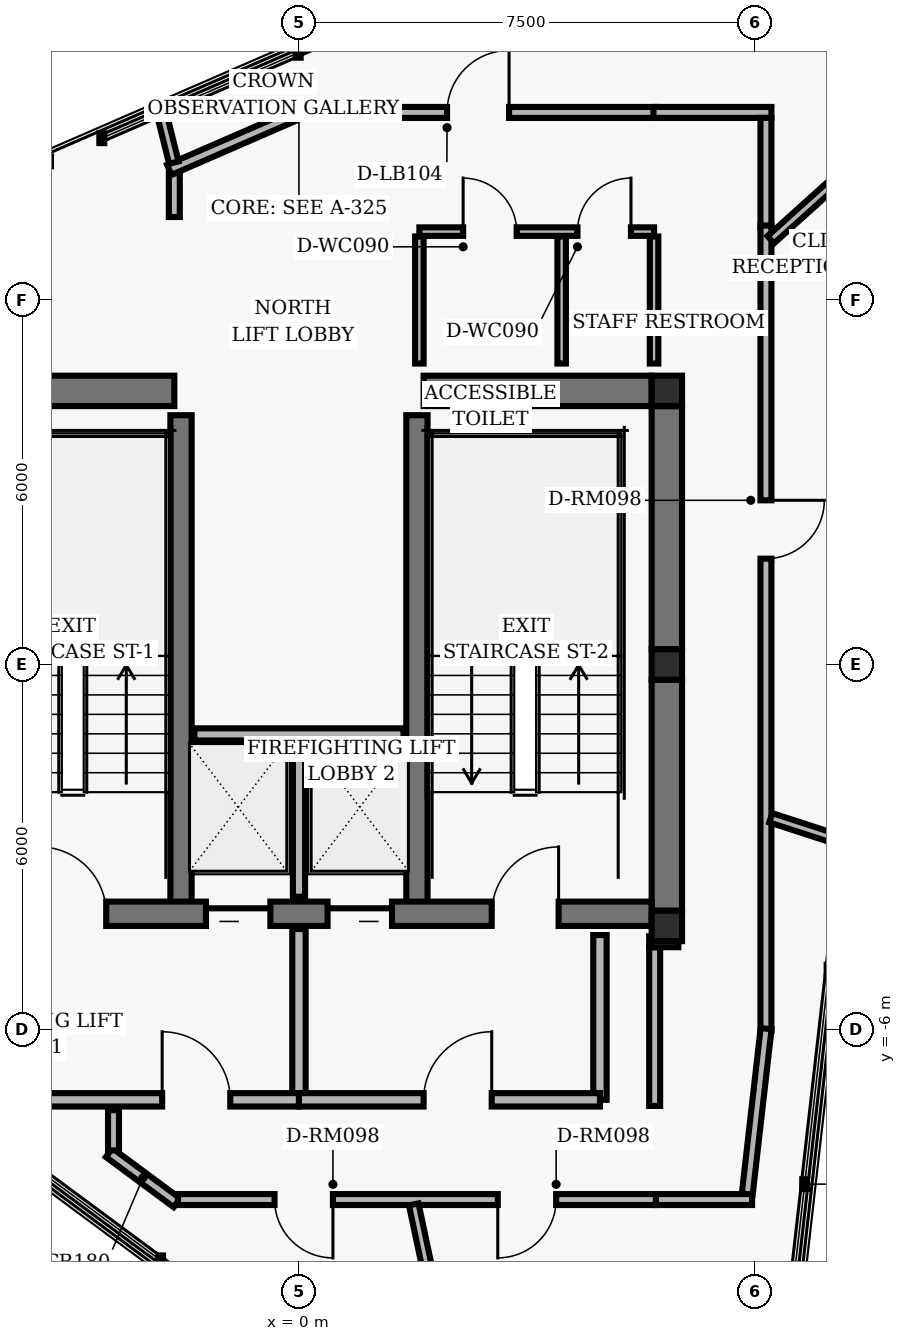
"""IFC4 building model, lengths in metres.
Left out: names, types, materials, properties, quantities, classifications, styles, units other than length and angle.
Written with IfcOpenShell. Run it as: python <this file> out.ifc"""

import sys

from ifc_helpers import new_model, si_unit, direction, frame, frame_2d, origin, origin_2d, place, context, subcontext, project, spatial, rectangle, hollow_rectangle, extrude, element, fill, save


model = new_model("IFC4")
c1 = context("Model", 3, precision=1e-05, world=origin(), true_north=direction((0.0, 1.0)))
c2 = subcontext(c1, "Body", "Model", "MODEL_VIEW")
j1 = project(units=[si_unit("LENGTHUNIT", "METRE"), si_unit("PLANEANGLEUNIT", "RADIAN")], contexts=[c1])
p1 = place(None, origin())
s1 = spatial("IfcSite", under=j1, at=p1, CompositionType="ELEMENT")
p2 = place(p1, origin())
s2 = spatial("IfcBuilding", under=s1, at=p2, CompositionType="ELEMENT")
p3 = place(p2, frame((0.0, 0.0, 249.12)))
s3 = spatial("IfcBuildingStorey", under=s2, at=p3, CompositionType="ELEMENT", Elevation=249.12)
for number, where, z_axis, x_axis in (
    (1, (6.05, 4.5, 0.0), (0.0, 0.0, 1.0), (1.0, 0.0, 0.0)),
    (2, (6.05, 0.0, 0.0), (0.0, 0.0, 1.0), (1.0, 0.0, 0.0)),
    (3, (6.05, -4.3, 0.0), (0.0, 0.0, 1.0), (1.0, 0.0, 0.0)),
):
    element("IfcColumn", number, at=place(p3, frame(where, z_axis=z_axis, x_axis=x_axis)), inside=s3, PredefinedType="COLUMN", context=c2, shape_type="SweptSolid", body=[
        extrude(hollow_rectangle(XDim=0.5, YDim=0.5, WallThickness=0.02, InnerFilletRadius=0.02, OuterFilletRadius=0.04, at=origin_2d()), origin(), (0.0, 0.0, 1.0), 2.88),
    ])
p4 = place(p3, frame((6.05, 0.25, 0.0), z_axis=(0.0, 0.0, 1.0), x_axis=(0.0, 1.0, 0.0)))
e4 = element("IfcWall", 4, at=p4, inside=s3, PredefinedType="SHEAR", context=c2, shape_type="SweptSolid", body=[
    extrude(rectangle(XDim=4.0, YDim=0.5, at=frame_2d((2.0, 0.0))), origin(), (0.0, 0.0, 1.0), 2.648),
])
p5 = place(p3, frame((6.05, -4.05, 0.0), z_axis=(0.0, 0.0, 1.0), x_axis=(0.0, 1.0, 0.0)))
e5 = element("IfcWall", 5, at=p5, inside=s3, PredefinedType="SHEAR", context=c2, shape_type="SweptSolid", body=[
    extrude(rectangle(XDim=3.8, YDim=0.5, at=frame_2d((1.9, 0.0))), origin(), (0.0, 0.0, 1.0), 2.648),
])
for number, where, z_axis, x_axis in (
    (6, (-1.94, -4.1, 0.0), (0.0, 0.0, 1.0), (0.0, 1.0, 0.0)),
    (7, (1.94, -4.1, 0.0), (0.0, 0.0, 1.0), (0.0, 1.0, 0.0)),
):
    element("IfcWall", number, at=place(p3, frame(where, z_axis=z_axis, x_axis=x_axis)), inside=s3, PredefinedType="SHEAR", context=c2, shape_type="SweptSolid", body=[
        extrude(rectangle(XDim=8.2, YDim=0.35, at=frame_2d((4.1, 0.0))), origin(), (0.0, 0.0, 1.0), 2.648),
    ])
p6 = place(p3, frame((-5.8, -4.1, 0.0), z_axis=(0.0, 0.0, 1.0), x_axis=(1.0, 0.0, 0.0)))
e8 = element("IfcWall", 8, at=p6, inside=s3, PredefinedType="SHEAR", context=c2, shape_type="SweptSolid", body=[
    extrude(rectangle(XDim=11.6, YDim=0.4, at=frame_2d((5.8, 0.0))), origin(), (0.0, 0.0, 1.0), 2.648),
])
p7 = place(p6, frame((1.53, 0.0, 0.0)))
e9 = element("IfcOpeningElement", 9, at=p7, cuts=e8, PredefinedType="OPENING", context=c2, shape_type="SweptSolid", body=[
    extrude(rectangle(XDim=1.1, YDim=2.04, at=frame_2d((0.55, 1.02))), frame((0.0, 0.21, 0.0), z_axis=(0.0, -1.0, 0.0), x_axis=(1.0, 0.0, 0.0)), (0.0, 0.0, 1.0), 0.42),
])
p8 = place(p6, frame((8.97, 0.0, 0.0)))
e10 = element("IfcOpeningElement", 10, at=p8, cuts=e8, PredefinedType="OPENING", context=c2, shape_type="SweptSolid", body=[
    extrude(rectangle(XDim=1.1, YDim=2.04, at=frame_2d((0.55, 1.02))), frame((0.0, 0.21, 0.0), z_axis=(0.0, -1.0, 0.0), x_axis=(1.0, 0.0, 0.0)), (0.0, 0.0, 1.0), 0.42),
])
p9 = place(p6, frame((4.27, 0.0, 0.0)))
e11 = element("IfcOpeningElement", 11, at=p9, cuts=e8, PredefinedType="OPENING", context=c2, shape_type="SweptSolid", body=[
    extrude(rectangle(XDim=1.06, YDim=2.04, at=frame_2d((0.53, 1.02))), frame((0.0, 0.21, 0.0), z_axis=(0.0, -1.0, 0.0), x_axis=(1.0, 0.0, 0.0)), (0.0, 0.0, 1.0), 0.42),
])
p10 = place(p6, frame((6.27, 0.0, 0.0)))
e12 = element("IfcOpeningElement", 12, at=p10, cuts=e8, PredefinedType="OPENING", context=c2, shape_type="SweptSolid", body=[
    extrude(rectangle(XDim=1.06, YDim=2.04, at=frame_2d((0.53, 1.02))), frame((0.0, 0.21, 0.0), z_axis=(0.0, -1.0, 0.0), x_axis=(1.0, 0.0, 0.0)), (0.0, 0.0, 1.0), 0.42),
])
for number, where, z_axis, x_axis in (
    (13, (-5.8, 4.5, 0.0), (0.0, 0.0, 1.0), (1.0, 0.0, 0.0)),
    (14, (2.05, 4.5, 0.0), (0.0, 0.0, 1.0), (1.0, 0.0, 0.0)),
):
    element("IfcWall", number, at=place(p3, frame(where, z_axis=z_axis, x_axis=x_axis)), inside=s3, PredefinedType="SHEAR", context=c2, shape_type="SweptSolid", body=[
        extrude(rectangle(XDim=3.75, YDim=0.5, at=frame_2d((1.875, 0.0))), origin(), (0.0, 0.0, 1.0), 2.648),
    ])
p11 = place(p3, frame((0.0, -3.82, 0.0), z_axis=(0.0, 0.0, 1.0), x_axis=(0.0, 1.0, 0.0)))
e15 = element("IfcWall", 15, at=p11, inside=s3, PredefinedType="PARTITIONING", context=c2, shape_type="SweptSolid", body=[
    extrude(rectangle(XDim=2.67, YDim=0.2, at=frame_2d((1.335, 0.0))), origin(), (0.0, 0.0, 1.0), 2.623),
])
p12 = place(p3, frame((-1.72, -1.15, 0.0), z_axis=(0.0, 0.0, 1.0), x_axis=(1.0, 0.0, 0.0)))
e16 = element("IfcWall", 16, at=p12, inside=s3, PredefinedType="PARTITIONING", context=c2, shape_type="SweptSolid", body=[
    extrude(rectangle(XDim=3.44, YDim=0.2, at=frame_2d((1.72, 0.0))), origin(), (0.0, 0.0, 1.0), 2.623),
])
p13 = place(p3, frame((4.95, -7.16, 0.0), z_axis=(0.0, 0.0, 1.0), x_axis=(0.0, 1.0, 0.0)))
e17 = element("IfcWall", 17, at=p13, inside=s3, PredefinedType="PARTITIONING", context=c2, shape_type="SweptSolid", body=[
    extrude(rectangle(XDim=2.71, YDim=0.22, at=frame_2d((1.355, 0.0))), origin(), (0.0, 0.0, 1.0), 2.623),
])
p14 = place(p3, frame((0.0, -7.16, 0.0), z_axis=(0.0, 0.0, 1.0), x_axis=(0.0, 1.0, 0.0)))
e18 = element("IfcWall", 18, at=p14, inside=s3, PredefinedType="PARTITIONING", context=c2, shape_type="SweptSolid", body=[
    extrude(rectangle(XDim=2.81, YDim=0.22, at=frame_2d((1.405, 0.0))), origin(), (0.0, 0.0, 1.0), 2.623),
])
p15 = place(p3, frame((-5.4, -7.16, 0.0), z_axis=(0.0, 0.0, 1.0), x_axis=(1.0, 0.0, 0.0)))
e19 = element("IfcWall", 19, at=p15, inside=s3, PredefinedType="PARTITIONING", context=c2, shape_type="SweptSolid", body=[
    extrude(rectangle(XDim=5.4, YDim=0.22, at=frame_2d((2.7, 0.0))), origin(), (0.0, 0.0, 1.0), 2.623),
])
p16 = place(p15, frame((3.15, 0.0, 0.0)))
e20 = element("IfcOpeningElement", 20, at=p16, cuts=e19, PredefinedType="OPENING", context=c2, shape_type="SweptSolid", body=[
    extrude(rectangle(XDim=1.12, YDim=2.02, at=frame_2d((0.56, 1.01))), frame((0.0, 0.12, 0.0), z_axis=(0.0, -1.0, 0.0), x_axis=(1.0, 0.0, 0.0)), (0.0, 0.0, 1.0), 0.24),
])
p17 = place(p3, frame((0.0, -7.16, 0.0), z_axis=(0.0, 0.0, 1.0), x_axis=(1.0, 0.0, 0.0)))
e21 = element("IfcWall", 21, at=p17, inside=s3, PredefinedType="PARTITIONING", context=c2, shape_type="SweptSolid", body=[
    extrude(rectangle(XDim=4.95, YDim=0.22, at=frame_2d((2.475, 0.0))), origin(), (0.0, 0.0, 1.0), 2.623),
])
p18 = place(p17, frame((2.05, 0.0, 0.0)))
e22 = element("IfcOpeningElement", 22, at=p18, cuts=e21, PredefinedType="OPENING", context=c2, shape_type="SweptSolid", body=[
    extrude(rectangle(XDim=1.12, YDim=2.02, at=frame_2d((0.56, 1.01))), frame((0.0, 0.12, 0.0), z_axis=(0.0, -1.0, 0.0), x_axis=(1.0, 0.0, 0.0)), (0.0, 0.0, 1.0), 0.24),
])
p19 = place(p3, frame((1.98, 4.95, 0.0), z_axis=(0.0, 0.0, 1.0), x_axis=(0.0, 1.0, 0.0)))
e23 = element("IfcWall", 23, at=p19, inside=s3, PredefinedType="PARTITIONING", context=c2, shape_type="SweptSolid", body=[
    extrude(rectangle(XDim=2.09, YDim=0.14, at=frame_2d((1.045, 0.0))), origin(), (0.0, 0.0, 1.0), 2.623),
])
p20 = place(p3, frame((5.84, 4.95, 0.0), z_axis=(0.0, 0.0, 1.0), x_axis=(0.0, 1.0, 0.0)))
e24 = element("IfcWall", 24, at=p20, inside=s3, PredefinedType="PARTITIONING", context=c2, shape_type="SweptSolid", body=[
    extrude(rectangle(XDim=2.09, YDim=0.14, at=frame_2d((1.045, 0.0))), origin(), (0.0, 0.0, 1.0), 2.153),
])
p21 = place(p3, frame((1.98, 7.12, 0.0), z_axis=(0.0, 0.0, 1.0), x_axis=(1.0, 0.0, 0.0)))
e25 = element("IfcWall", 25, at=p21, inside=s3, PredefinedType="PARTITIONING", context=c2, shape_type="SweptSolid", body=[
    extrude(rectangle(XDim=3.86, YDim=0.14, at=frame_2d((1.93, 0.0))), origin(), (0.0, 0.0, 1.0), 2.623),
])
p22 = place(p21, frame((0.72, 0.0, 0.0)))
e26 = element("IfcOpeningElement", 26, at=p22, cuts=e25, PredefinedType="OPENING", context=c2, shape_type="SweptSolid", body=[
    extrude(rectangle(XDim=0.88, YDim=2.02, at=frame_2d((0.44, 1.01))), frame((0.0, 0.08, 0.0), z_axis=(0.0, -1.0, 0.0), x_axis=(1.0, 0.0, 0.0)), (0.0, 0.0, 1.0), 0.16),
])
p23 = place(p21, frame((2.6, 0.0, 0.0)))
e27 = element("IfcOpeningElement", 27, at=p23, cuts=e25, PredefinedType="OPENING", context=c2, shape_type="SweptSolid", body=[
    extrude(rectangle(XDim=0.88, YDim=2.02, at=frame_2d((0.44, 1.01))), frame((0.0, 0.08, 0.0), z_axis=(0.0, -1.0, 0.0), x_axis=(1.0, 0.0, 0.0)), (0.0, 0.0, 1.0), 0.16),
])
p24 = place(p3, frame((4.32, 4.95, 0.0), z_axis=(0.0, 0.0, 1.0), x_axis=(0.0, 1.0, 0.0)))
e28 = element("IfcWall", 28, at=p24, inside=s3, PredefinedType="PARTITIONING", context=c2, shape_type="SweptSolid", body=[
    extrude(rectangle(XDim=2.09, YDim=0.14, at=frame_2d((1.045, 0.0))), origin(), (0.0, 0.0, 1.0), 2.623),
])
p25 = place(p3, frame((-2.007, -8.854, 0.0), z_axis=(0.0, 0.0, 1.0), x_axis=(-0.803868825014, 0.594806617458, 0.0)))
e29 = element("IfcWall", 29, at=p25, inside=s3, PredefinedType="PARTITIONING", context=c2, shape_type="SweptSolid", body=[
    extrude(rectangle(XDim=1.387, YDim=0.18, at=frame_2d((0.694, 0.0))), origin(), (0.0, 0.0, 1.0), 2.203),
])
p26 = place(p3, frame((-3.05, -7.992, 0.0), z_axis=(0.0, 0.0, 1.0), x_axis=(0.0, 1.0, 0.0)))
e30 = element("IfcWall", 30, at=p26, inside=s3, PredefinedType="PARTITIONING", context=c2, shape_type="SweptSolid", body=[
    extrude(rectangle(XDim=0.662, YDim=0.18, at=frame_2d((0.331, 0.0))), origin(), (0.0, 0.0, 1.0), 2.623),
])
p27 = place(p3, frame((5.85, -7.26, 0.0), z_axis=(0.0, 0.0, 1.0), x_axis=(0.0, 1.0, 0.0)))
e31 = element("IfcWall", 31, at=p27, inside=s3, PredefinedType="PARTITIONING", context=c2, shape_type="SweptSolid", body=[
    extrude(rectangle(XDim=2.61, YDim=0.18, at=frame_2d((1.305, 0.0))), origin(), (0.0, 0.0, 1.0), 2.153),
])
p28 = place(p3, frame((5.76, -4.56, 0.0), z_axis=(0.0, 0.0, 1.0), x_axis=(1.0, 0.0, 0.0)))
e32 = element("IfcWall", 32, at=p28, inside=s3, PredefinedType="PARTITIONING", context=c2, shape_type="SweptSolid", body=[
    extrude(rectangle(XDim=0.48, YDim=0.18, at=frame_2d((0.24, 0.0))), origin(), (0.0, 0.0, 1.0), 2.623),
])
p29 = place(p3, frame((-2.05, 7.36, 0.0), z_axis=(0.0, 0.0, 1.0), x_axis=(0.0, 1.0, 0.0)))
e33 = element("IfcWall", 33, at=p29, inside=s3, PredefinedType="PARTITIONING", context=c2, shape_type="SweptSolid", body=[
    extrude(rectangle(XDim=0.721, YDim=0.18, at=frame_2d((0.36, 0.0))), origin(), (0.0, 0.0, 1.0), 2.623),
])
p30 = place(p3, frame((-2.133, 8.135, 0.0), z_axis=(0.0, 0.0, 1.0), x_axis=(0.917076554143, 0.398711165935, 0.0)))
e34 = element("IfcWall", 34, at=p30, inside=s3, PredefinedType="PARTITIONING", context=c2, shape_type="SweptSolid", body=[
    extrude(rectangle(XDim=2.389, YDim=0.18, at=frame_2d((1.195, 0.0))), origin(), (0.0, 0.0, 1.0), 2.203),
])
p31 = place(p3, frame((0.02, 9.08, 0.0), z_axis=(0.0, 0.0, 1.0), x_axis=(1.0, 0.0, 0.0)))
e35 = element("IfcWall", 35, at=p31, inside=s3, PredefinedType="PARTITIONING", context=c2, shape_type="SweptSolid", body=[
    extrude(rectangle(XDim=5.85, YDim=0.18, at=frame_2d((2.925, 0.0))), origin(), (0.0, 0.0, 1.0), 2.623),
])
p32 = place(p31, frame((2.415, 0.0, 0.0)))
e36 = element("IfcOpeningElement", 36, at=p32, cuts=e35, PredefinedType="OPENING", context=c2, shape_type="SweptSolid", body=[
    extrude(rectangle(XDim=1.02, YDim=2.02, at=frame_2d((0.51, 1.01))), frame((0.0, 0.1, 0.0), z_axis=(0.0, -1.0, 0.0), x_axis=(1.0, 0.0, 0.0)), (0.0, 0.0, 1.0), 0.2),
])
p33 = place(p3, frame((5.83, 9.08, 0.0), z_axis=(0.0, 0.0, 1.0), x_axis=(1.0, 0.0, 0.0)))
e37 = element("IfcWall", 37, at=p33, inside=s3, PredefinedType="PARTITIONING", context=c2, shape_type="SweptSolid", body=[
    extrude(rectangle(XDim=1.94, YDim=0.18, at=frame_2d((0.97, 0.0))), origin(), (0.0, 0.0, 1.0), 2.623),
])
p34 = place(p3, frame((7.68, 8.99, 0.0), z_axis=(0.0, 0.0, 1.0), x_axis=(0.0, -1.0, 0.0)))
e38 = element("IfcWall", 38, at=p34, inside=s3, PredefinedType="PARTITIONING", context=c2, shape_type="SweptSolid", body=[
    extrude(rectangle(XDim=1.81, YDim=0.18, at=frame_2d((0.905, 0.0))), origin(), (0.0, 0.0, 1.0), 2.623),
])
p35 = place(p3, frame((7.68, 7.22, 0.0), z_axis=(0.0, 0.0, 1.0), x_axis=(0.0, -1.0, 0.0)))
e39 = element("IfcWall", 39, at=p35, inside=s3, PredefinedType="PARTITIONING", context=c2, shape_type="SweptSolid", body=[
    extrude(rectangle(XDim=13.248, YDim=0.18, at=frame_2d((6.624, 0.0))), origin(), (0.0, 0.0, 1.0), 2.203),
])
p36 = place(p35, frame((4.52, 0.0, 0.0)))
e40 = element("IfcOpeningElement", 40, at=p36, cuts=e39, PredefinedType="OPENING", context=c2, shape_type="SweptSolid", body=[
    extrude(rectangle(XDim=0.96, YDim=2.02, at=frame_2d((0.48, 1.01))), frame((0.0, 0.1, 0.0), z_axis=(0.0, -1.0, 0.0), x_axis=(1.0, 0.0, 0.0)), (0.0, 0.0, 1.0), 0.2),
])
p37 = place(p3, frame((7.682, -5.989, 0.0), z_axis=(0.0, 0.0, 1.0), x_axis=(-0.113257574401, -0.993565660558, 0.0)))
e41 = element("IfcWall", 41, at=p37, inside=s3, PredefinedType="PARTITIONING", context=c2, shape_type="SweptSolid", body=[
    extrude(rectangle(XDim=2.74, YDim=0.18, at=frame_2d((1.37, 0.0))), origin(), (0.0, 0.0, 1.0), 2.203),
])
p38 = place(p3, frame((7.452, -8.8, 0.0), z_axis=(0.0, 0.0, 1.0), x_axis=(-1.0, 0.0, 0.0)))
e42 = element("IfcWall", 42, at=p38, inside=s3, PredefinedType="PARTITIONING", context=c2, shape_type="SweptSolid", body=[
    extrude(rectangle(XDim=1.622, YDim=0.18, at=frame_2d((0.811, 0.0))), origin(), (0.0, 0.0, 1.0), 2.623),
])
p39 = place(p3, frame((5.87, -8.8, 0.0), z_axis=(0.0, 0.0, 1.0), x_axis=(-1.0, 0.0, 0.0)))
e43 = element("IfcWall", 43, at=p39, inside=s3, PredefinedType="PARTITIONING", context=c2, shape_type="SweptSolid", body=[
    extrude(rectangle(XDim=7.86, YDim=0.18, at=frame_2d((3.93, 0.0))), origin(), (0.0, 0.0, 1.0), 2.623),
])
p40 = place(p39, frame((5.312, 0.0, 0.0)))
e44 = element("IfcOpeningElement", 44, at=p40, cuts=e43, PredefinedType="OPENING", context=c2, shape_type="SweptSolid", body=[
    extrude(rectangle(XDim=0.96, YDim=2.02, at=frame_2d((0.48, 1.01))), frame((0.0, 0.1, 0.0), z_axis=(0.0, -1.0, 0.0), x_axis=(1.0, 0.0, 0.0)), (0.0, 0.0, 1.0), 0.2),
])
p41 = place(p39, frame((1.64, 0.0, 0.0)))
e45 = element("IfcOpeningElement", 45, at=p41, cuts=e43, PredefinedType="OPENING", context=c2, shape_type="SweptSolid", body=[
    extrude(rectangle(XDim=0.96, YDim=2.02, at=frame_2d((0.48, 1.01))), frame((0.0, 0.1, 0.0), z_axis=(0.0, -1.0, 0.0), x_axis=(1.0, 0.0, 0.0)), (0.0, 0.0, 1.0), 0.2),
])
p42 = place(p3, frame((1.887, -8.88, 0.0), z_axis=(0.0, 0.0, 1.0), x_axis=(0.207919908666, -0.97814585394, 0.0)))
e46 = element("IfcWall", 46, at=p42, inside=s3, PredefinedType="PARTITIONING", context=c2, shape_type="SweptSolid", body=[
    extrude(rectangle(XDim=5.109, YDim=0.16, at=frame_2d((2.554, 0.0))), origin(), (0.0, 0.0, 1.0), 2.623),
])
p43 = place(p3, frame((7.76, -2.521, 0.0), z_axis=(0.0, 0.0, 1.0), x_axis=(0.951056587506, -0.30901677521, 0.0)))
e47 = element("IfcWall", 47, at=p43, inside=s3, PredefinedType="PARTITIONING", context=c2, shape_type="SweptSolid", body=[
    extrude(rectangle(XDim=1.434, YDim=0.16, at=frame_2d((0.717, 0.0))), origin(), (0.0, 0.0, 1.0), 2.623),
])
p44 = place(p3, frame((7.76, 6.987, 0.0), z_axis=(0.0, 0.0, 1.0), x_axis=(0.743132057251, 0.669144786639, 0.0)))
e48 = element("IfcWall", 48, at=p44, inside=s3, PredefinedType="PARTITIONING", context=c2, shape_type="SweptSolid", body=[
    extrude(rectangle(XDim=3.745, YDim=0.16, at=frame_2d((1.873, 0.0))), origin(), (0.0, 0.0, 1.0), 2.153),
])
p45 = place(p3, frame((-2.058, 8.255, 0.0), z_axis=(0.0, 0.0, 1.0), x_axis=(-0.242030631144, 0.970268608988, 0.0)))
e49 = element("IfcWall", 49, at=p45, inside=s3, PredefinedType="PARTITIONING", context=c2, shape_type="SweptSolid", body=[
    extrude(rectangle(XDim=1.024, YDim=0.16, at=frame_2d((0.512, 0.0))), origin(), (0.0, 0.0, 1.0), 2.623),
])
p46 = place(p7, origin())
e50 = element("IfcDoor", 50, at=p46, inside=s3, OperationType="SINGLE_SWING_LEFT", PredefinedType="DOOR", context=c2, shape_type="SweptSolid", body=[
    extrude(rectangle(XDim=1.1, YDim=2.04, at=frame_2d((0.55, 1.02))), frame((0.0, 0.025, 0.0), z_axis=(0.0, -1.0, 0.0), x_axis=(1.0, 0.0, 0.0)), (0.0, 0.0, 1.0), 0.05),
])
fill(e9, e50)
p47 = place(p8, origin())
e51 = element("IfcDoor", 51, at=p47, inside=s3, OperationType="SINGLE_SWING_RIGHT", PredefinedType="DOOR", context=c2, shape_type="SweptSolid", body=[
    extrude(rectangle(XDim=1.1, YDim=2.04, at=frame_2d((0.55, 1.02))), frame((0.0, 0.025, 0.0), z_axis=(0.0, -1.0, 0.0), x_axis=(1.0, 0.0, 0.0)), (0.0, 0.0, 1.0), 0.05),
])
fill(e10, e51)
p48 = place(p9, origin())
e52 = element("IfcDoor", 52, at=p48, inside=s3, OperationType="SLIDING_TO_LEFT", PredefinedType="DOOR", context=c2, shape_type="SweptSolid", body=[
    extrude(rectangle(XDim=1.06, YDim=2.04, at=frame_2d((0.53, 1.02))), frame((0.0, 0.025, 0.0), z_axis=(0.0, -1.0, 0.0), x_axis=(1.0, 0.0, 0.0)), (0.0, 0.0, 1.0), 0.05),
])
fill(e11, e52)
p49 = place(p10, origin())
e53 = element("IfcDoor", 53, at=p49, inside=s3, OperationType="SLIDING_TO_RIGHT", PredefinedType="DOOR", context=c2, shape_type="SweptSolid", body=[
    extrude(rectangle(XDim=1.06, YDim=2.04, at=frame_2d((0.53, 1.02))), frame((0.0, 0.025, 0.0), z_axis=(0.0, -1.0, 0.0), x_axis=(1.0, 0.0, 0.0)), (0.0, 0.0, 1.0), 0.05),
])
fill(e12, e53)
p50 = place(p16, origin())
e54 = element("IfcDoor", 54, at=p50, inside=s3, OperationType="SINGLE_SWING_LEFT", PredefinedType="DOOR", context=c2, shape_type="SweptSolid", body=[
    extrude(rectangle(XDim=1.12, YDim=2.02, at=frame_2d((0.56, 1.01))), frame((0.0, 0.025, 0.0), z_axis=(0.0, -1.0, 0.0), x_axis=(1.0, 0.0, 0.0)), (0.0, 0.0, 1.0), 0.05),
])
fill(e20, e54)
p51 = place(p18, origin())
e55 = element("IfcDoor", 55, at=p51, inside=s3, OperationType="SINGLE_SWING_RIGHT", PredefinedType="DOOR", context=c2, shape_type="SweptSolid", body=[
    extrude(rectangle(XDim=1.12, YDim=2.02, at=frame_2d((0.56, 1.01))), frame((0.0, 0.025, 0.0), z_axis=(0.0, -1.0, 0.0), x_axis=(1.0, 0.0, 0.0)), (0.0, 0.0, 1.0), 0.05),
])
fill(e22, e55)
p52 = place(p22, origin())
e56 = element("IfcDoor", 56, at=p52, inside=s3, OperationType="SINGLE_SWING_LEFT", PredefinedType="DOOR", context=c2, shape_type="SweptSolid", body=[
    extrude(rectangle(XDim=0.88, YDim=2.02, at=frame_2d((0.44, 1.01))), frame((0.0, 0.025, 0.0), z_axis=(0.0, -1.0, 0.0), x_axis=(1.0, 0.0, 0.0)), (0.0, 0.0, 1.0), 0.05),
])
fill(e26, e56)
p53 = place(p23, origin())
e57 = element("IfcDoor", 57, at=p53, inside=s3, OperationType="SINGLE_SWING_RIGHT", PredefinedType="DOOR", context=c2, shape_type="SweptSolid", body=[
    extrude(rectangle(XDim=0.88, YDim=2.02, at=frame_2d((0.44, 1.01))), frame((0.0, 0.025, 0.0), z_axis=(0.0, -1.0, 0.0), x_axis=(1.0, 0.0, 0.0)), (0.0, 0.0, 1.0), 0.05),
])
fill(e27, e57)
p54 = place(p40, origin())
e58 = element("IfcDoor", 58, at=p54, inside=s3, OperationType="SINGLE_SWING_LEFT", PredefinedType="DOOR", context=c2, shape_type="SweptSolid", body=[
    extrude(rectangle(XDim=0.96, YDim=2.02, at=frame_2d((0.48, 1.01))), frame((0.0, 0.025, 0.0), z_axis=(0.0, -1.0, 0.0), x_axis=(1.0, 0.0, 0.0)), (0.0, 0.0, 1.0), 0.05),
])
fill(e44, e58)
p55 = place(p41, origin())
e59 = element("IfcDoor", 59, at=p55, inside=s3, OperationType="SINGLE_SWING_RIGHT", PredefinedType="DOOR", context=c2, shape_type="SweptSolid", body=[
    extrude(rectangle(XDim=0.96, YDim=2.02, at=frame_2d((0.48, 1.01))), frame((0.0, 0.025, 0.0), z_axis=(0.0, -1.0, 0.0), x_axis=(1.0, 0.0, 0.0)), (0.0, 0.0, 1.0), 0.05),
])
fill(e45, e59)
p56 = place(p36, origin())
e60 = element("IfcDoor", 60, at=p56, inside=s3, OperationType="SINGLE_SWING_LEFT", PredefinedType="DOOR", context=c2, shape_type="SweptSolid", body=[
    extrude(rectangle(XDim=0.96, YDim=2.02, at=frame_2d((0.48, 1.01))), frame((0.0, 0.025, 0.0), z_axis=(0.0, -1.0, 0.0), x_axis=(1.0, 0.0, 0.0)), (0.0, 0.0, 1.0), 0.05),
])
fill(e40, e60)
p57 = place(p32, origin())
e61 = element("IfcDoor", 61, at=p57, inside=s3, OperationType="SINGLE_SWING_RIGHT", PredefinedType="DOOR", context=c2, shape_type="SweptSolid", body=[
    extrude(rectangle(XDim=1.02, YDim=2.02, at=frame_2d((0.51, 1.01))), frame((0.0, 0.025, 0.0), z_axis=(0.0, -1.0, 0.0), x_axis=(1.0, 0.0, 0.0)), (0.0, 0.0, 1.0), 0.05),
])
fill(e36, e61)
save(model, sys.argv[1])
